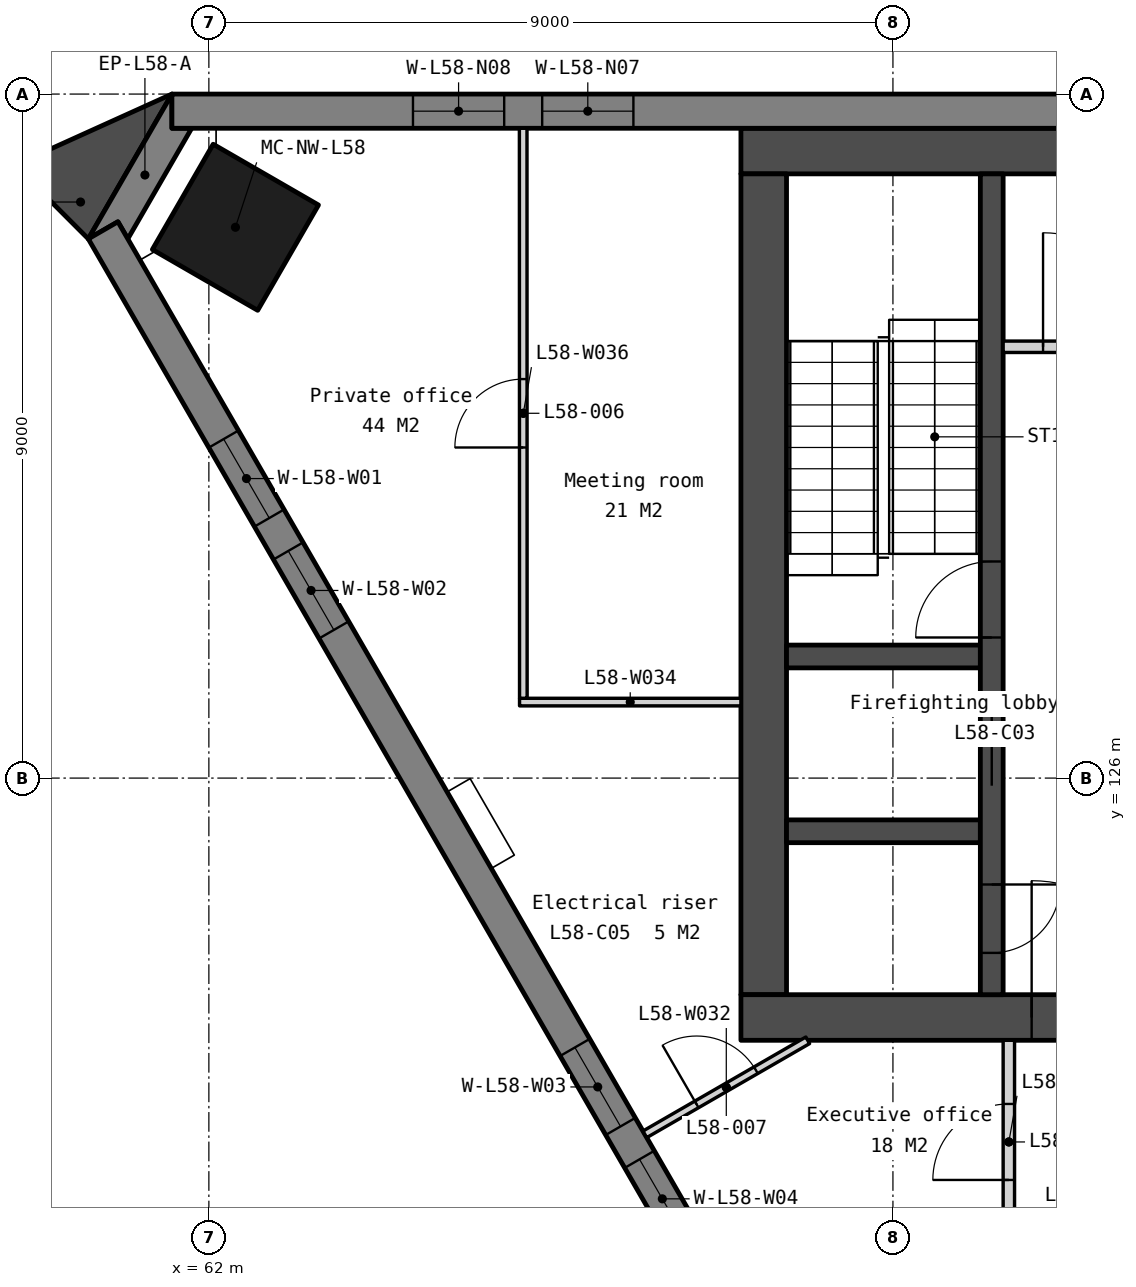
"""IFC4 building model, lengths in metres.
Left out: names, types, materials, properties, quantities, classifications, styles, units other than length and angle.
Written with IfcOpenShell. Run it as: python <this file> out.ifc"""

import sys

from ifc_helpers import new_model, si_unit, direction, frame, frame_2d, origin, origin_2d, place, context, subcontext, project, spatial, polyline, rectangle, outline, extrude, element, fill, save


model = new_model("IFC4")
c1 = context("Model", 3, precision=1e-05, world=origin(), true_north=direction((0.0, 1.0)))
c2 = subcontext(c1, "Body", "Model", "MODEL_VIEW")
j1 = project(units=[si_unit("LENGTHUNIT", "METRE"), si_unit("PLANEANGLEUNIT", "RADIAN")], contexts=[c1])
p1 = place(None, origin())
s1 = spatial("IfcSite", under=j1, at=p1, CompositionType="ELEMENT")
p2 = place(p1, origin())
s2 = spatial("IfcBuilding", under=s1, at=p2, CompositionType="ELEMENT")
p3 = place(p2, frame((0.0, 0.0, 238.7)))
s3 = spatial("IfcBuildingStorey", under=s2, at=p3, CompositionType="ELEMENT", Elevation=238.7)
p4 = place(p3, frame((62.349, 133.247, 0.0), z_axis=(0.0, 0.0, 1.0), x_axis=(-0.5, -0.866025403784, 0.0)))
e1 = element("IfcColumn", 1, at=p4, inside=s3, PredefinedType="COLUMN", context=c2, shape_type="SweptSolid", body=[
    extrude(rectangle(XDim=1.6, YDim=1.6, at=origin_2d()), origin(), (0.0, 0.0, 1.0), 3.9),
])
p5 = place(p3, frame((69.0, 134.25, 0.0), z_axis=(0.0, 0.0, 1.0), x_axis=(1.0, 0.0, 0.0)))
e2 = element("IfcWall", 2, at=p5, inside=s3, PredefinedType="SOLIDWALL", context=c2, shape_type="SweptSolid", body=[
    extrude(rectangle(XDim=22.0, YDim=0.6, at=frame_2d((11.0, 0.0))), origin(), (0.0, 0.0, 1.0), 3.75),
])
p6 = place(p3, frame((69.3, 133.95, 0.0), z_axis=(0.0, 0.0, 1.0), x_axis=(0.0, -1.0, 0.0)))
e3 = element("IfcWall", 3, at=p6, inside=s3, PredefinedType="SOLIDWALL", context=c2, shape_type="SweptSolid", body=[
    extrude(rectangle(XDim=10.8, YDim=0.6, at=frame_2d((5.4, 0.0))), origin(), (0.0, 0.0, 1.0), 3.75),
])
p7 = place(p3, frame((69.0, 122.85, 0.0), z_axis=(0.0, 0.0, 1.0), x_axis=(1.0, 0.0, 0.0)))
e4 = element("IfcWall", 4, at=p7, inside=s3, PredefinedType="SOLIDWALL", context=c2, shape_type="SweptSolid", body=[
    extrude(rectangle(XDim=22.0, YDim=0.6, at=frame_2d((11.0, 0.0))), origin(), (0.0, 0.0, 1.0), 3.75),
])
p8 = place(p7, frame((16.375, 0.0, 0.0)))
e5 = element("IfcOpeningElement", 5, at=p8, cuts=e4, PredefinedType="OPENING", context=c2, shape_type="SweptSolid", body=[
    extrude(rectangle(XDim=1.8, YDim=2.1, at=frame_2d((0.9, 1.05))), frame((0.0, 0.31, 0.0), z_axis=(0.0, -1.0, 0.0), x_axis=(1.0, 0.0, 0.0)), (0.0, 0.0, 1.0), 0.62),
])
p9 = place(p7, frame((3.825, 0.0, 0.0)))
e6 = element("IfcOpeningElement", 6, at=p9, cuts=e4, PredefinedType="OPENING", context=c2, shape_type="SweptSolid", body=[
    extrude(rectangle(XDim=1.8, YDim=2.1, at=frame_2d((0.9, 1.05))), frame((0.0, 0.31, 0.0), z_axis=(0.0, -1.0, 0.0), x_axis=(1.0, 0.0, 0.0)), (0.0, 0.0, 1.0), 0.62),
])
p10 = place(p7, frame((12.85, 0.0, 0.0)))
e7 = element("IfcOpeningElement", 7, at=p10, cuts=e4, PredefinedType="OPENING", context=c2, shape_type="SweptSolid", body=[
    extrude(rectangle(XDim=1.5, YDim=2.1, at=frame_2d((0.75, 1.05))), frame((0.0, 0.31, 0.0), z_axis=(0.0, -1.0, 0.0), x_axis=(1.0, 0.0, 0.0)), (0.0, 0.0, 1.0), 0.62),
])
for number, where, z_axis, x_axis in (
    (8, (69.6, 127.6, 0.0), (0.0, 0.0, 1.0), (1.0, 0.0, 0.0)),
    (9, (69.6, 125.3, 0.0), (0.0, 0.0, 1.0), (1.0, 0.0, 0.0)),
):
    element("IfcWall", number, at=place(p3, frame(where, z_axis=z_axis, x_axis=x_axis)), inside=s3, PredefinedType="SOLIDWALL", context=c2, shape_type="SweptSolid", body=[
        extrude(rectangle(XDim=2.55, YDim=0.3, at=frame_2d((1.275, 0.0))), origin(), (0.0, 0.0, 1.0), 3.75),
    ])
p11 = place(p3, frame((72.3, 133.95, 0.0), z_axis=(0.0, 0.0, 1.0), x_axis=(0.0, -1.0, 0.0)))
e10 = element("IfcWall", 10, at=p11, inside=s3, PredefinedType="SOLIDWALL", context=c2, shape_type="SweptSolid", body=[
    extrude(rectangle(XDim=10.8, YDim=0.3, at=frame_2d((5.4, 0.0))), origin(), (0.0, 0.0, 1.0), 3.75),
])
p12 = place(p11, frame((6.95, 0.0, 0.0)))
e11 = element("IfcOpeningElement", 11, at=p12, cuts=e10, PredefinedType="OPENING", context=c2, shape_type="SweptSolid", body=[
    extrude(rectangle(XDim=1.1, YDim=2.1, at=frame_2d((0.55, 1.05))), frame((0.0, 0.16, 0.0), z_axis=(0.0, -1.0, 0.0), x_axis=(1.0, 0.0, 0.0)), (0.0, 0.0, 1.0), 0.32),
])
p13 = place(p11, frame((9.35, 0.0, 0.0)))
e12 = element("IfcOpeningElement", 12, at=p13, cuts=e10, PredefinedType="OPENING", context=c2, shape_type="SweptSolid", body=[
    extrude(rectangle(XDim=0.9, YDim=2.1, at=frame_2d((0.45, 1.05))), frame((0.0, 0.16, 0.0), z_axis=(0.0, -1.0, 0.0), x_axis=(1.0, 0.0, 0.0)), (0.0, 0.0, 1.0), 0.32),
])
p14 = place(p11, frame((5.1, 0.0, 0.0)))
e13 = element("IfcOpeningElement", 13, at=p14, cuts=e10, PredefinedType="OPENING", context=c2, shape_type="SweptSolid", body=[
    extrude(rectangle(XDim=1.0, YDim=2.1, at=frame_2d((0.5, 1.05))), frame((0.0, 0.16, 0.0), z_axis=(0.0, -1.0, 0.0), x_axis=(1.0, 0.0, 0.0)), (0.0, 0.0, 1.0), 0.32),
])
p15 = place(p3, frame((72.45, 131.675, 0.0), z_axis=(0.0, 0.0, 1.0), x_axis=(1.0, 0.0, 0.0)))
e14 = element("IfcWall", 14, at=p15, inside=s3, PredefinedType="PARTITIONING", context=c2, shape_type="SweptSolid", body=[
    extrude(rectangle(XDim=3.45, YDim=0.15, at=frame_2d((1.725, 0.0))), origin(), (0.0, 0.0, 1.0), 3.75),
])
p16 = place(p15, frame((0.525, 0.0, 0.0)))
e15 = element("IfcOpeningElement", 15, at=p16, cuts=e14, PredefinedType="OPENING", context=c2, shape_type="SweptSolid", body=[
    extrude(rectangle(XDim=1.5, YDim=2.1, at=frame_2d((0.75, 1.05))), frame((0.0, 0.085, 0.0), z_axis=(0.0, -1.0, 0.0), x_axis=(1.0, 0.0, 0.0)), (0.0, 0.0, 1.0), 0.17),
])
p17 = place(p3, frame((0.0, 0.0, -0.45)))
e16 = element("IfcWall", 16, at=p17, inside=s3, PredefinedType="SOLIDWALL", context=c2, shape_type="SweptSolid", body=[
    extrude(outline(polyline([(61.514, 135.0), (61.514, 134.55), (61.774, 134.55), (60.933, 133.095), (60.803, 133.32), (60.414, 133.095), (61.514, 135.0)])), origin(), (0.0, 0.0, 1.0), 4.2),
])
p18 = place(p3, frame((98.486, 134.775, -0.45), z_axis=(0.0, 0.0, 1.0), x_axis=(-1.0, 0.0, 0.0)))
e17 = element("IfcWall", 17, at=p18, inside=s3, PredefinedType="SOLIDWALL", context=c2, shape_type="SweptSolid", body=[
    extrude(outline(polyline([(36.972, 0.0), (36.972, 4.2), (0.0, 4.2), (0.0, 0.0), (36.972, 0.0)])), frame((0.0, 0.225, 0.0), z_axis=(0.0, -1.0, 0.0), x_axis=(1.0, 0.0, 0.0)), (0.0, 0.0, 1.0), 0.45),
])
p19 = place(p18, frame((3.172, 0.0, 1.25)))
e18 = element("IfcOpeningElement", 18, at=p19, cuts=e17, PredefinedType="OPENING", context=c2, shape_type="SweptSolid", body=[
    extrude(rectangle(XDim=1.2, YDim=2.2, at=frame_2d((0.6, 1.1))), frame((0.0, 0.235, 0.0), z_axis=(0.0, -1.0, 0.0), x_axis=(1.0, 0.0, 0.0)), (0.0, 0.0, 1.0), 0.47),
])
p20 = place(p18, frame((4.872, 0.0, 1.25)))
e19 = element("IfcOpeningElement", 19, at=p20, cuts=e17, PredefinedType="OPENING", context=c2, shape_type="SweptSolid", body=[
    extrude(rectangle(XDim=1.2, YDim=2.2, at=frame_2d((0.6, 1.1))), frame((0.0, 0.235, 0.0), z_axis=(0.0, -1.0, 0.0), x_axis=(1.0, 0.0, 0.0)), (0.0, 0.0, 1.0), 0.47),
])
p21 = place(p18, frame((12.415, 0.0, 1.25)))
e20 = element("IfcOpeningElement", 20, at=p21, cuts=e17, PredefinedType="OPENING", context=c2, shape_type="SweptSolid", body=[
    extrude(rectangle(XDim=1.2, YDim=2.2, at=frame_2d((0.6, 1.1))), frame((0.0, 0.235, 0.0), z_axis=(0.0, -1.0, 0.0), x_axis=(1.0, 0.0, 0.0)), (0.0, 0.0, 1.0), 0.47),
])
p22 = place(p18, frame((14.115, 0.0, 1.25)))
e21 = element("IfcOpeningElement", 21, at=p22, cuts=e17, PredefinedType="OPENING", context=c2, shape_type="SweptSolid", body=[
    extrude(rectangle(XDim=1.2, YDim=2.2, at=frame_2d((0.6, 1.1))), frame((0.0, 0.235, 0.0), z_axis=(0.0, -1.0, 0.0), x_axis=(1.0, 0.0, 0.0)), (0.0, 0.0, 1.0), 0.47),
])
p23 = place(p18, frame((21.658, 0.0, 1.25)))
e22 = element("IfcOpeningElement", 22, at=p23, cuts=e17, PredefinedType="OPENING", context=c2, shape_type="SweptSolid", body=[
    extrude(rectangle(XDim=1.2, YDim=2.2, at=frame_2d((0.6, 1.1))), frame((0.0, 0.235, 0.0), z_axis=(0.0, -1.0, 0.0), x_axis=(1.0, 0.0, 0.0)), (0.0, 0.0, 1.0), 0.47),
])
p24 = place(p18, frame((23.358, 0.0, 1.25)))
e23 = element("IfcOpeningElement", 23, at=p24, cuts=e17, PredefinedType="OPENING", context=c2, shape_type="SweptSolid", body=[
    extrude(rectangle(XDim=1.2, YDim=2.2, at=frame_2d((0.6, 1.1))), frame((0.0, 0.235, 0.0), z_axis=(0.0, -1.0, 0.0), x_axis=(1.0, 0.0, 0.0)), (0.0, 0.0, 1.0), 0.47),
])
p25 = place(p18, frame((30.901, 0.0, 1.25)))
e24 = element("IfcOpeningElement", 24, at=p25, cuts=e17, PredefinedType="OPENING", context=c2, shape_type="SweptSolid", body=[
    extrude(rectangle(XDim=1.2, YDim=2.2, at=frame_2d((0.6, 1.1))), frame((0.0, 0.235, 0.0), z_axis=(0.0, -1.0, 0.0), x_axis=(1.0, 0.0, 0.0)), (0.0, 0.0, 1.0), 0.47),
])
p26 = place(p18, frame((32.601, 0.0, 1.25)))
e25 = element("IfcOpeningElement", 25, at=p26, cuts=e17, PredefinedType="OPENING", context=c2, shape_type="SweptSolid", body=[
    extrude(rectangle(XDim=1.2, YDim=2.2, at=frame_2d((0.6, 1.1))), frame((0.0, 0.235, 0.0), z_axis=(0.0, -1.0, 0.0), x_axis=(1.0, 0.0, 0.0)), (0.0, 0.0, 1.0), 0.47),
])
p27 = place(p3, frame((60.609, 133.207, -0.45), z_axis=(0.0, 0.0, 1.0), x_axis=(0.500002536638, -0.866023939251, 0.0)))
e26 = element("IfcWall", 26, at=p27, inside=s3, PredefinedType="SOLIDWALL", context=c2, shape_type="SweptSolid", body=[
    extrude(outline(polyline([(36.972, 0.0), (36.972, 4.2), (0.0, 4.2), (0.0, 0.0), (36.972, 0.0)])), frame((0.0, 0.225, 0.0), z_axis=(0.0, -1.0, 0.0), x_axis=(1.0, 0.0, 0.0)), (0.0, 0.0, 1.0), 0.45),
])
p28 = place(p27, frame((3.172, 0.0, 1.25)))
e27 = element("IfcOpeningElement", 27, at=p28, cuts=e26, PredefinedType="OPENING", context=c2, shape_type="SweptSolid", body=[
    extrude(rectangle(XDim=1.2, YDim=2.2, at=frame_2d((0.6, 1.1))), frame((0.0, 0.235, 0.0), z_axis=(0.0, -1.0, 0.0), x_axis=(1.0, 0.0, 0.0)), (0.0, 0.0, 1.0), 0.47),
])
p29 = place(p27, frame((4.872, 0.0, 1.25)))
e28 = element("IfcOpeningElement", 28, at=p29, cuts=e26, PredefinedType="OPENING", context=c2, shape_type="SweptSolid", body=[
    extrude(rectangle(XDim=1.2, YDim=2.2, at=frame_2d((0.6, 1.1))), frame((0.0, 0.235, 0.0), z_axis=(0.0, -1.0, 0.0), x_axis=(1.0, 0.0, 0.0)), (0.0, 0.0, 1.0), 0.47),
])
p30 = place(p27, frame((12.415, 0.0, 1.25)))
e29 = element("IfcOpeningElement", 29, at=p30, cuts=e26, PredefinedType="OPENING", context=c2, shape_type="SweptSolid", body=[
    extrude(rectangle(XDim=1.2, YDim=2.2, at=frame_2d((0.6, 1.1))), frame((0.0, 0.235, 0.0), z_axis=(0.0, -1.0, 0.0), x_axis=(1.0, 0.0, 0.0)), (0.0, 0.0, 1.0), 0.47),
])
p31 = place(p27, frame((14.115, 0.0, 1.25)))
e30 = element("IfcOpeningElement", 30, at=p31, cuts=e26, PredefinedType="OPENING", context=c2, shape_type="SweptSolid", body=[
    extrude(rectangle(XDim=1.2, YDim=2.2, at=frame_2d((0.6, 1.1))), frame((0.0, 0.235, 0.0), z_axis=(0.0, -1.0, 0.0), x_axis=(1.0, 0.0, 0.0)), (0.0, 0.0, 1.0), 0.47),
])
p32 = place(p27, frame((21.658, 0.0, 1.25)))
e31 = element("IfcOpeningElement", 31, at=p32, cuts=e26, PredefinedType="OPENING", context=c2, shape_type="SweptSolid", body=[
    extrude(rectangle(XDim=1.2, YDim=2.2, at=frame_2d((0.6, 1.1))), frame((0.0, 0.235, 0.0), z_axis=(0.0, -1.0, 0.0), x_axis=(1.0, 0.0, 0.0)), (0.0, 0.0, 1.0), 0.47),
])
p33 = place(p27, frame((23.358, 0.0, 1.25)))
e32 = element("IfcOpeningElement", 32, at=p33, cuts=e26, PredefinedType="OPENING", context=c2, shape_type="SweptSolid", body=[
    extrude(rectangle(XDim=1.2, YDim=2.2, at=frame_2d((0.6, 1.1))), frame((0.0, 0.235, 0.0), z_axis=(0.0, -1.0, 0.0), x_axis=(1.0, 0.0, 0.0)), (0.0, 0.0, 1.0), 0.47),
])
p34 = place(p27, frame((30.901, 0.0, 1.25)))
e33 = element("IfcOpeningElement", 33, at=p34, cuts=e26, PredefinedType="OPENING", context=c2, shape_type="SweptSolid", body=[
    extrude(rectangle(XDim=1.2, YDim=2.2, at=frame_2d((0.6, 1.1))), frame((0.0, 0.235, 0.0), z_axis=(0.0, -1.0, 0.0), x_axis=(1.0, 0.0, 0.0)), (0.0, 0.0, 1.0), 0.47),
])
p35 = place(p27, frame((32.601, 0.0, 1.25)))
e34 = element("IfcOpeningElement", 34, at=p35, cuts=e26, PredefinedType="OPENING", context=c2, shape_type="SweptSolid", body=[
    extrude(rectangle(XDim=1.2, YDim=2.2, at=frame_2d((0.6, 1.1))), frame((0.0, 0.235, 0.0), z_axis=(0.0, -1.0, 0.0), x_axis=(1.0, 0.0, 0.0)), (0.0, 0.0, 1.0), 0.47),
])
p36 = place(p3, frame((0.0, 0.0, -0.45)))
e35 = element("IfcWall", 35, at=p36, inside=s3, PredefinedType="SOLIDWALL", context=c2, shape_type="SweptSolid", body=[
    extrude(outline(polyline([(61.514, 135.0), (59.446, 134.064), (60.414, 133.095), (61.514, 135.0)])), origin(), (0.0, 0.0, 1.0), 4.2),
])
p37 = place(p3, frame((72.525, 119.875, 0.0), z_axis=(0.0, 0.0, 1.0), x_axis=(0.0, 1.0, 0.0)))
e36 = element("IfcWall", 36, at=p37, inside=s3, PredefinedType="PARTITIONING", context=c2, shape_type="SweptSolid", body=[
    extrude(rectangle(XDim=2.675, YDim=0.15, at=frame_2d((1.337, 0.0))), origin(), (0.0, 0.0, 1.0), 3.75),
])
p38 = place(p37, frame((0.837, 0.0, 0.0)))
e37 = element("IfcOpeningElement", 37, at=p38, cuts=e36, PredefinedType="OPENING", context=c2, shape_type="SweptSolid", body=[
    extrude(rectangle(XDim=1.0, YDim=2.1, at=frame_2d((0.5, 1.05))), frame((0.0, 0.085, 0.0), z_axis=(0.0, -1.0, 0.0), x_axis=(1.0, 0.0, 0.0)), (0.0, 0.0, 1.0), 0.17),
])
p39 = place(p3, frame((67.736, 121.313, 0.0), z_axis=(0.0, 0.0, 1.0), x_axis=(0.866024577697, 0.500001430823, 0.0)))
e38 = element("IfcWall", 38, at=p39, inside=s3, PredefinedType="PARTITIONING", context=c2, shape_type="SweptSolid", body=[
    extrude(rectangle(XDim=2.475, YDim=0.1, at=frame_2d((1.237, 0.0))), origin(), (0.0, 0.0, 1.0), 3.75),
])
p40 = place(p39, frame((0.787, 0.0, 0.0)))
e39 = element("IfcOpeningElement", 39, at=p40, cuts=e38, PredefinedType="OPENING", context=c2, shape_type="SweptSolid", body=[
    extrude(rectangle(XDim=0.9, YDim=2.1, at=frame_2d((0.45, 1.05))), frame((0.0, 0.06, 0.0), z_axis=(0.0, -1.0, 0.0), x_axis=(1.0, 0.0, 0.0)), (0.0, 0.0, 1.0), 0.12),
])
p41 = place(p3, frame((66.087, 127.0, 0.0), z_axis=(0.0, 0.0, 1.0), x_axis=(1.0, 0.0, 0.0)))
e40 = element("IfcWall", 40, at=p41, inside=s3, PredefinedType="PARTITIONING", context=c2, shape_type="SweptSolid", body=[
    extrude(rectangle(XDim=2.913, YDim=0.1, at=frame_2d((1.456, 0.0))), origin(), (0.0, 0.0, 1.0), 3.75),
])
p42 = place(p3, frame((66.137, 127.05, 0.0), z_axis=(0.0, 0.0, 1.0), x_axis=(-0.000260425135, 0.999999966089, 0.0)))
e41 = element("IfcWall", 41, at=p42, inside=s3, PredefinedType="PARTITIONING", context=c2, shape_type="SweptSolid", body=[
    extrude(rectangle(XDim=7.5, YDim=0.1, at=frame_2d((3.75, 0.0))), origin(), (0.0, 0.0, 1.0), 3.75),
])
p43 = place(p42, frame((3.3, 0.0, 0.0)))
e42 = element("IfcOpeningElement", 42, at=p43, cuts=e41, PredefinedType="OPENING", context=c2, shape_type="SweptSolid", body=[
    extrude(rectangle(XDim=0.9, YDim=2.1, at=frame_2d((0.45, 1.05))), frame((0.0, 0.06, 0.0), z_axis=(0.0, -1.0, 0.0), x_axis=(1.0, 0.0, 0.0)), (0.0, 0.0, 1.0), 0.12),
])
p44 = place(p12, origin())
e43 = element("IfcDoor", 43, at=p44, inside=s3, OperationType="SLIDING_TO_LEFT", PredefinedType="DOOR", context=c2, shape_type="SweptSolid", body=[
    extrude(rectangle(XDim=1.1, YDim=2.1, at=frame_2d((0.55, 1.05))), frame((0.0, 0.025, 0.0), z_axis=(0.0, -1.0, 0.0), x_axis=(1.0, 0.0, 0.0)), (0.0, 0.0, 1.0), 0.05),
])
fill(e11, e43)
p45 = place(p9, origin())
e44 = element("IfcDoor", 44, at=p45, inside=s3, OperationType="DOUBLE_DOOR_DOUBLE_SWING", PredefinedType="DOOR", context=c2, shape_type="SweptSolid", body=[
    extrude(rectangle(XDim=1.8, YDim=2.1, at=frame_2d((0.9, 1.05))), frame((0.0, 0.025, 0.0), z_axis=(0.0, -1.0, 0.0), x_axis=(1.0, 0.0, 0.0)), (0.0, 0.0, 1.0), 0.05),
])
fill(e6, e44)
p46 = place(p16, origin())
e45 = element("IfcDoor", 45, at=p46, inside=s3, OperationType="DOUBLE_DOOR_DOUBLE_SWING", PredefinedType="DOOR", context=c2, shape_type="SweptSolid", body=[
    extrude(rectangle(XDim=1.5, YDim=2.1, at=frame_2d((0.75, 1.05))), frame((0.0, 0.025, 0.0), z_axis=(0.0, -1.0, 0.0), x_axis=(1.0, 0.0, 0.0)), (0.0, 0.0, 1.0), 0.05),
])
fill(e15, e45)
p47 = place(p13, origin())
e46 = element("IfcDoor", 46, at=p47, inside=s3, OperationType="SINGLE_SWING_LEFT", PredefinedType="DOOR", context=c2, shape_type="SweptSolid", body=[
    extrude(rectangle(XDim=0.9, YDim=2.1, at=frame_2d((0.45, 1.05))), frame((0.0, 0.025, 0.0), z_axis=(0.0, -1.0, 0.0), x_axis=(1.0, 0.0, 0.0)), (0.0, 0.0, 1.0), 0.05),
])
fill(e12, e46)
p48 = place(p14, origin())
e47 = element("IfcDoor", 47, at=p48, inside=s3, OperationType="SINGLE_SWING_RIGHT", PredefinedType="DOOR", context=c2, shape_type="SweptSolid", body=[
    extrude(rectangle(XDim=1.0, YDim=2.1, at=frame_2d((0.5, 1.05))), frame((0.0, 0.025, 0.0), z_axis=(0.0, -1.0, 0.0), x_axis=(1.0, 0.0, 0.0)), (0.0, 0.0, 1.0), 0.05),
])
fill(e13, e47)
p49 = place(p25, origin())
e48 = element("IfcWindow", 48, at=p49, inside=s3, PartitioningType="SINGLE_PANEL", PredefinedType="WINDOW", context=c2, shape_type="SweptSolid", body=[
    extrude(rectangle(XDim=1.2, YDim=2.2, at=frame_2d((0.6, 1.1))), frame((0.0, 0.03, 0.0), z_axis=(0.0, -1.0, 0.0), x_axis=(1.0, 0.0, 0.0)), (0.0, 0.0, 1.0), 0.06),
])
fill(e24, e48)
p50 = place(p26, origin())
e49 = element("IfcWindow", 49, at=p50, inside=s3, PartitioningType="SINGLE_PANEL", PredefinedType="WINDOW", context=c2, shape_type="SweptSolid", body=[
    extrude(rectangle(XDim=1.2, YDim=2.2, at=frame_2d((0.6, 1.1))), frame((0.0, 0.03, 0.0), z_axis=(0.0, -1.0, 0.0), x_axis=(1.0, 0.0, 0.0)), (0.0, 0.0, 1.0), 0.06),
])
fill(e25, e49)
p51 = place(p28, origin())
e50 = element("IfcWindow", 50, at=p51, inside=s3, PartitioningType="SINGLE_PANEL", PredefinedType="WINDOW", context=c2, shape_type="SweptSolid", body=[
    extrude(rectangle(XDim=1.2, YDim=2.2, at=frame_2d((0.6, 1.1))), frame((0.0, 0.03, 0.0), z_axis=(0.0, -1.0, 0.0), x_axis=(1.0, 0.0, 0.0)), (0.0, 0.0, 1.0), 0.06),
])
fill(e27, e50)
p52 = place(p29, origin())
e51 = element("IfcWindow", 51, at=p52, inside=s3, PartitioningType="SINGLE_PANEL", PredefinedType="WINDOW", context=c2, shape_type="SweptSolid", body=[
    extrude(rectangle(XDim=1.2, YDim=2.2, at=frame_2d((0.6, 1.1))), frame((0.0, 0.03, 0.0), z_axis=(0.0, -1.0, 0.0), x_axis=(1.0, 0.0, 0.0)), (0.0, 0.0, 1.0), 0.06),
])
fill(e28, e51)
p53 = place(p30, origin())
e52 = element("IfcWindow", 52, at=p53, inside=s3, PartitioningType="SINGLE_PANEL", PredefinedType="WINDOW", context=c2, shape_type="SweptSolid", body=[
    extrude(rectangle(XDim=1.2, YDim=2.2, at=frame_2d((0.6, 1.1))), frame((0.0, 0.03, 0.0), z_axis=(0.0, -1.0, 0.0), x_axis=(1.0, 0.0, 0.0)), (0.0, 0.0, 1.0), 0.06),
])
fill(e29, e52)
p54 = place(p31, origin())
e53 = element("IfcWindow", 53, at=p54, inside=s3, PartitioningType="SINGLE_PANEL", PredefinedType="WINDOW", context=c2, shape_type="SweptSolid", body=[
    extrude(rectangle(XDim=1.2, YDim=2.2, at=frame_2d((0.6, 1.1))), frame((0.0, 0.03, 0.0), z_axis=(0.0, -1.0, 0.0), x_axis=(1.0, 0.0, 0.0)), (0.0, 0.0, 1.0), 0.06),
])
fill(e30, e53)
p55 = place(p43, origin())
e54 = element("IfcDoor", 54, at=p55, inside=s3, OperationType="SINGLE_SWING_LEFT", PredefinedType="DOOR", context=c2, shape_type="SweptSolid", body=[
    extrude(rectangle(XDim=0.9, YDim=2.1, at=frame_2d((0.45, 1.05))), frame((0.0, 0.025, 0.0), z_axis=(0.0, -1.0, 0.0), x_axis=(1.0, 0.0, 0.0)), (0.0, 0.0, 1.0), 0.05),
])
fill(e42, e54)
p56 = place(p40, origin())
e55 = element("IfcDoor", 55, at=p56, inside=s3, OperationType="SINGLE_SWING_LEFT", PredefinedType="DOOR", context=c2, shape_type="SweptSolid", body=[
    extrude(rectangle(XDim=0.9, YDim=2.1, at=frame_2d((0.45, 1.05))), frame((0.0, 0.025, 0.0), z_axis=(0.0, -1.0, 0.0), x_axis=(1.0, 0.0, 0.0)), (0.0, 0.0, 1.0), 0.05),
])
fill(e39, e55)
p57 = place(p38, origin())
e56 = element("IfcDoor", 56, at=p57, inside=s3, OperationType="SINGLE_SWING_LEFT", PredefinedType="DOOR", context=c2, shape_type="SweptSolid", body=[
    extrude(rectangle(XDim=1.0, YDim=2.1, at=frame_2d((0.5, 1.05))), frame((0.0, 0.025, 0.0), z_axis=(0.0, -1.0, 0.0), x_axis=(1.0, 0.0, 0.0)), (0.0, 0.0, 1.0), 0.05),
])
fill(e37, e56)
save(model, sys.argv[1])
